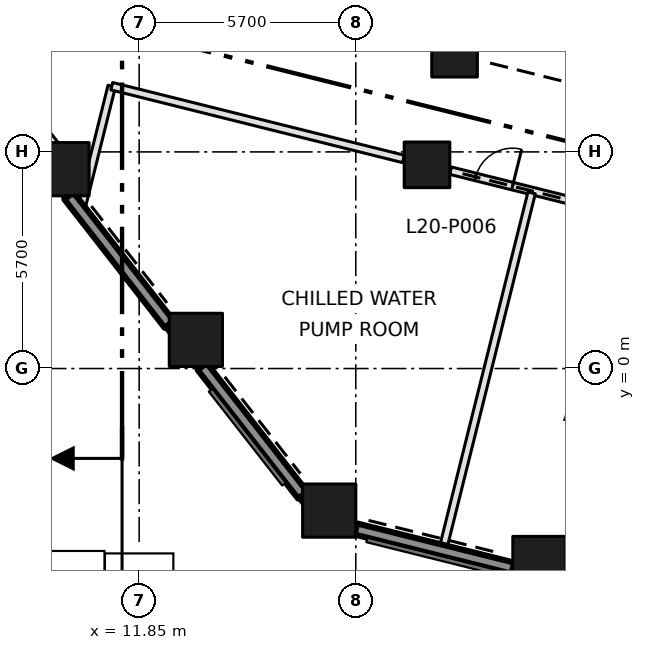
"""IFC4 building model, lengths in metres.
Left out: names, types, materials, properties, quantities, classifications, styles, units other than length and angle.
Written with IfcOpenShell. Run it as: python <this file> out.ifc"""

import sys

from ifc_helpers import new_model, si_unit, direction, frame, frame_2d, origin, origin_2d, place, context, subcontext, project, spatial, rectangle, extrude, element, fill, save


model = new_model("IFC4")
c1 = context("Model", 3, precision=1e-05, world=origin(), true_north=direction((0.0, 1.0)))
c2 = subcontext(c1, "Body", "Model", "MODEL_VIEW")
j1 = project(units=[si_unit("LENGTHUNIT", "METRE"), si_unit("PLANEANGLEUNIT", "RADIAN")], contexts=[c1])
p1 = place(None, origin())
s1 = spatial("IfcSite", under=j1, at=p1, CompositionType="ELEMENT")
p2 = place(p1, origin())
s2 = spatial("IfcBuilding", under=s1, at=p2, CompositionType="ELEMENT")
p3 = place(p2, frame((0.0, 0.0, 91.8)))
s3 = spatial("IfcBuildingStorey", under=s2, at=p3, CompositionType="ELEMENT", Elevation=91.8)
for number, where, z_axis, x_axis in (
    (1, (16.851, -3.738, 0.0), (0.0, 0.0, 1.0), (1.0, 0.0, 0.0)),
    (2, (13.342, 0.754, 0.0), (0.0, 0.0, 1.0), (1.0, 0.0, 0.0)),
    (3, (9.833, 5.245, 0.0), (0.0, 0.0, 1.0), (1.0, 0.0, 0.0)),
    (4, (22.382, -5.117, 0.0), (0.0, 0.0, 1.0), (1.0, 0.0, 0.0)),
):
    element("IfcColumn", number, at=place(p3, frame(where, z_axis=z_axis, x_axis=x_axis)), inside=s3, PredefinedType="COLUMN", context=c2, shape_type="SweptSolid", body=[
        extrude(rectangle(XDim=1.4, YDim=1.4, at=origin_2d()), origin(), (0.0, 0.0, 1.0), 5.4),
    ])
for number, where, z_axis, x_axis in (
    (5, (19.424, 5.36, 0.0), (0.0, 0.0, 1.0), (1.0, 0.0, 0.0)),
    (6, (20.149, 8.271, 0.0), (0.0, 0.0, 1.0), (1.0, 0.0, 0.0)),
):
    element("IfcColumn", number, at=place(p3, frame(where, z_axis=z_axis, x_axis=x_axis)), inside=s3, PredefinedType="COLUMN", context=c2, shape_type="SweptSolid", body=[
        extrude(rectangle(XDim=1.2, YDim=1.2, at=origin_2d()), origin(), (0.0, 0.0, 1.0), 5.4),
    ])
p4 = place(p3, frame((10.352, 4.313, 0.0), z_axis=(0.0, 0.0, 1.0), x_axis=(0.241748498686, 0.970338942526, 0.0)))
e7 = element("IfcWall", 7, at=p4, inside=s3, PredefinedType="PARTITIONING", context=c2, shape_type="SweptSolid", body=[
    extrude(rectangle(XDim=3.211, YDim=0.2, at=frame_2d((1.606, 0.0))), origin(), (0.0, 0.0, 1.0), 5.1),
])
p5 = place(p3, frame((11.128, 7.429, 0.0), z_axis=(0.0, 0.0, 1.0), x_axis=(0.970289363722, -0.241947412982, 0.0)))
e8 = element("IfcWall", 8, at=p5, inside=s3, PredefinedType="PARTITIONING", context=c2, shape_type="SweptSolid", body=[
    extrude(rectangle(XDim=7.911, YDim=0.2, at=frame_2d((3.956, 0.0))), origin(), (0.0, 0.0, 1.0), 5.1),
])
p6 = place(p3, frame((20.044, 5.206, 0.0), z_axis=(0.0, 0.0, 1.0), x_axis=(0.970272283191, -0.242015901276, 0.0)))
e9 = element("IfcWall", 9, at=p6, inside=s3, PredefinedType="PARTITIONING", context=c2, shape_type="SweptSolid", body=[
    extrude(rectangle(XDim=4.421, YDim=0.2, at=frame_2d((2.211, 0.0))), origin(), (0.0, 0.0, 1.0), 2.684),
])
p7 = place(p6, frame((0.68, 0.0, 0.0)))
e10 = element("IfcOpeningElement", 10, at=p7, cuts=e9, PredefinedType="OPENING", context=c2, shape_type="SweptSolid", body=[
    extrude(rectangle(XDim=1.0, YDim=2.1, at=frame_2d((0.5, 1.05))), frame((0.0, 0.11, 0.0), z_axis=(0.0, -1.0, 0.0), x_axis=(1.0, 0.0, 0.0)), (0.0, 0.0, 1.0), 0.22),
])
p8 = place(p3, frame((19.862, -4.663, 0.0), z_axis=(0.0, 0.0, 1.0), x_axis=(0.241905276096, 0.970299869833, 0.0)))
e11 = element("IfcWall", 11, at=p8, inside=s3, PredefinedType="PARTITIONING", context=c2, shape_type="SweptSolid", body=[
    extrude(rectangle(XDim=9.57, YDim=0.2, at=frame_2d((4.785, 0.0))), origin(), (0.0, 0.0, 1.0), 5.1),
])
p9 = place(p3, frame((10.0, 4.545, 0.0), z_axis=(0.0, 0.0, 1.0), x_axis=(0.615648457815, -0.788020923827, 0.0)))
e12 = element("IfcWall", 12, at=p9, inside=s3, PredefinedType="SOLIDWALL", context=c2, shape_type="SweptSolid", body=[
    extrude(rectangle(XDim=4.292, YDim=0.3, at=frame_2d((2.146, 0.0))), origin(), (0.0, 0.0, 1.0), 4.3),
])
p10 = place(p3, frame((13.508, 0.054, 0.0), z_axis=(0.0, 0.0, 1.0), x_axis=(0.615616451599, -0.788045927926, 0.0)))
e13 = element("IfcWall", 13, at=p10, inside=s3, PredefinedType="SOLIDWALL", context=c2, shape_type="SweptSolid", body=[
    extrude(rectangle(XDim=4.293, YDim=0.3, at=frame_2d((2.146, 0.0))), origin(), (0.0, 0.0, 1.0), 4.3),
])
p11 = place(p3, frame((17.551, -4.222, 0.0), z_axis=(0.0, 0.0, 1.0), x_axis=(0.970344570435, -0.24172590806, 0.0)))
e14 = element("IfcWall", 14, at=p11, inside=s3, PredefinedType="SOLIDWALL", context=c2, shape_type="SweptSolid", body=[
    extrude(rectangle(XDim=4.257, YDim=0.3, at=frame_2d((2.128, 0.0))), origin(), (0.0, 0.0, 1.0), 4.3),
])
p12 = place(p7, origin())
e15 = element("IfcDoor", 15, at=p12, inside=s3, OperationType="SINGLE_SWING_RIGHT", PredefinedType="DOOR", context=c2, shape_type="SweptSolid", body=[
    extrude(rectangle(XDim=1.0, YDim=2.1, at=frame_2d((0.5, 1.05))), frame((0.0, 0.025, 0.0), z_axis=(0.0, -1.0, 0.0), x_axis=(1.0, 0.0, 0.0)), (0.0, 0.0, 1.0), 0.05),
])
fill(e10, e15)
save(model, sys.argv[1])
